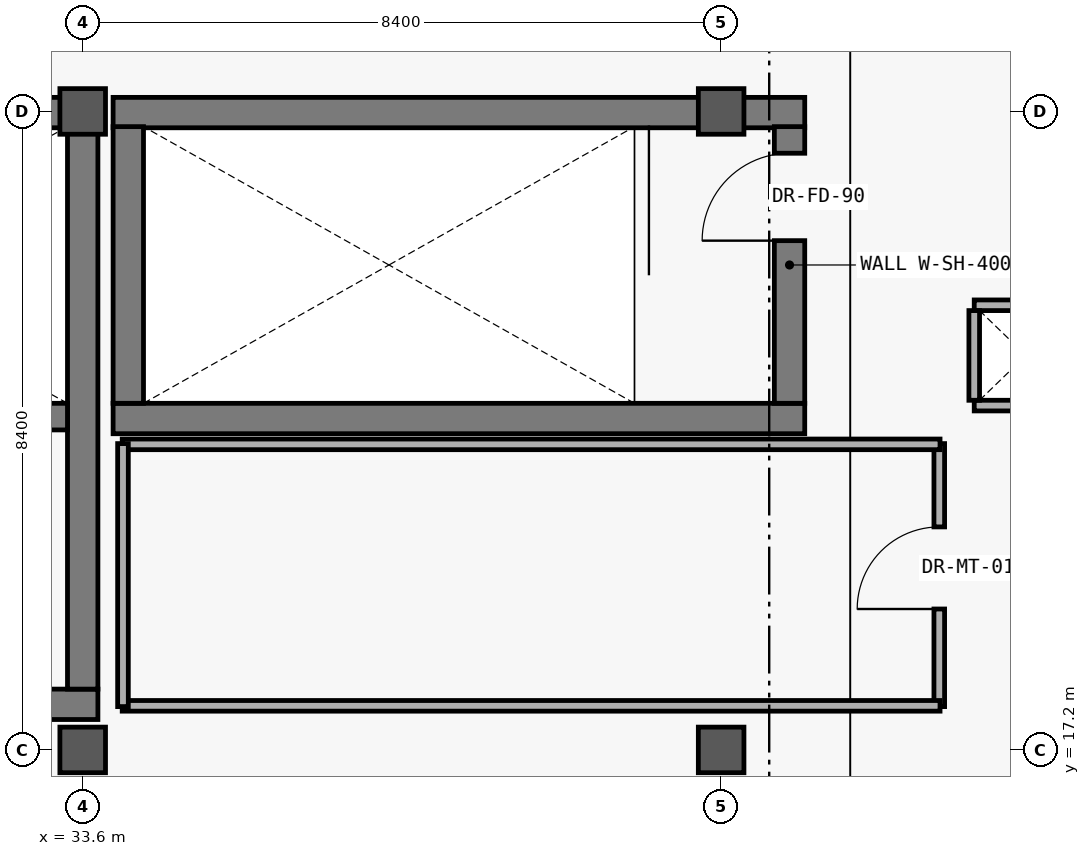
"""IFC4 building model, lengths in metres.
Left out: names, types, materials, properties, quantities, classifications, styles, units other than length and angle.
Written with IfcOpenShell. Run it as: python <this file> out.ifc"""

import sys

from ifc_helpers import new_model, si_unit, direction, frame, frame_2d, origin, origin_2d, place, context, subcontext, project, spatial, rectangle, extrude, element, fill, save


model = new_model("IFC4")
c1 = context("Model", 3, precision=1e-05, world=origin(), true_north=direction((0.0, 1.0)))
c2 = subcontext(c1, "Body", "Model", "MODEL_VIEW")
j1 = project(units=[si_unit("LENGTHUNIT", "METRE"), si_unit("PLANEANGLEUNIT", "RADIAN")], contexts=[c1])
p1 = place(None, origin())
s1 = spatial("IfcSite", under=j1, at=p1, CompositionType="ELEMENT")
p2 = place(p1, origin())
s2 = spatial("IfcBuilding", under=s1, at=p2, CompositionType="ELEMENT")
p3 = place(p2, frame((0.0, 0.0, 44.4)))
s3 = spatial("IfcBuildingStorey", under=s2, at=p3, CompositionType="ELEMENT", Elevation=44.4)
for number, where, z_axis, x_axis in (
    (1, (33.6, 17.2, 0.0), (0.0, 0.0, 1.0), (1.0, 0.0, 0.0)),
    (2, (33.6, 25.6, 0.0), (0.0, 0.0, 1.0), (1.0, 0.0, 0.0)),
    (3, (42.0, 17.2, 0.0), (0.0, 0.0, 1.0), (1.0, 0.0, 0.0)),
    (4, (42.0, 25.6, 0.0), (0.0, 0.0, 1.0), (1.0, 0.0, 0.0)),
):
    element("IfcColumn", number, at=place(p3, frame(where, z_axis=z_axis, x_axis=x_axis)), inside=s3, PredefinedType="COLUMN", context=c2, shape_type="SweptSolid", body=[
        extrude(rectangle(XDim=0.6, YDim=0.6, at=origin_2d()), origin(), (0.0, 0.0, 1.0), 4.2),
    ])
p4 = place(p3, frame((24.6, 17.8, 0.0), z_axis=(0.0, 0.0, 1.0), x_axis=(1.0, 0.0, 0.0)))
e5 = element("IfcWall", 5, at=p4, inside=s3, PredefinedType="SHEAR", context=c2, shape_type="SweptSolid", body=[
    extrude(rectangle(XDim=9.2, YDim=0.4, at=frame_2d((4.6, 0.0))), origin(), (0.0, 0.0, 1.0), 3.96),
])
p5 = place(p4, frame((1.1, 0.0, 0.0)))
e6 = element("IfcOpeningElement", 6, at=p5, cuts=e5, PredefinedType="OPENING", context=c2, shape_type="SweptSolid", body=[
    extrude(rectangle(XDim=1.2, YDim=2.2, at=frame_2d((0.6, 1.1))), frame((0.0, 0.21, 0.0), z_axis=(0.0, -1.0, 0.0), x_axis=(1.0, 0.0, 0.0)), (0.0, 0.0, 1.0), 0.42),
])
p6 = place(p4, frame((3.5, 0.0, 0.0)))
e7 = element("IfcOpeningElement", 7, at=p6, cuts=e5, PredefinedType="OPENING", context=c2, shape_type="SweptSolid", body=[
    extrude(rectangle(XDim=1.1, YDim=2.2, at=frame_2d((0.55, 1.1))), frame((0.0, 0.21, 0.0), z_axis=(0.0, -1.0, 0.0), x_axis=(1.0, 0.0, 0.0)), (0.0, 0.0, 1.0), 0.42),
])
p7 = place(p4, frame((5.9, 0.0, 0.0)))
e8 = element("IfcOpeningElement", 8, at=p7, cuts=e5, PredefinedType="OPENING", context=c2, shape_type="SweptSolid", body=[
    extrude(rectangle(XDim=1.1, YDim=2.2, at=frame_2d((0.55, 1.1))), frame((0.0, 0.21, 0.0), z_axis=(0.0, -1.0, 0.0), x_axis=(1.0, 0.0, 0.0)), (0.0, 0.0, 1.0), 0.42),
])
p8 = place(p3, frame((33.8, 25.585, 0.0), z_axis=(0.0, 0.0, 1.0), x_axis=(-1.0, 0.0, 0.0)))
e9 = element("IfcWall", 9, at=p8, inside=s3, PredefinedType="SHEAR", context=c2, shape_type="SweptSolid", body=[
    extrude(rectangle(XDim=9.2, YDim=0.4, at=frame_2d((4.6, 0.0))), origin(), (0.0, 0.0, 1.0), 3.96),
])
p9 = place(p3, frame((33.6, 18.0, 0.0), z_axis=(0.0, 0.0, 1.0), x_axis=(0.0, 1.0, 0.0)))
e10 = element("IfcWall", 10, at=p9, inside=s3, PredefinedType="SHEAR", context=c2, shape_type="SweptSolid", body=[
    extrude(rectangle(XDim=7.4, YDim=0.4, at=frame_2d((3.7, 0.0))), origin(), (0.0, 0.0, 1.0), 3.96),
])
p10 = place(p3, frame((25.0, 21.585, 0.0), z_axis=(0.0, 0.0, 1.0), x_axis=(1.0, 0.0, 0.0)))
e11 = element("IfcWall", 11, at=p10, inside=s3, PredefinedType="SHEAR", context=c2, shape_type="SweptSolid", body=[
    extrude(rectangle(XDim=8.4, YDim=0.35, at=frame_2d((4.2, 0.0))), origin(), (0.0, 0.0, 1.0), 3.96),
])
for number, where, z_axis, x_axis in (
    (12, (34.0, 21.56, 0.0), (0.0, 0.0, 1.0), (1.0, 0.0, 0.0)),
    (13, (43.1, 25.585, 0.0), (0.0, 0.0, 1.0), (-1.0, 0.0, 0.0)),
):
    element("IfcWall", number, at=place(p3, frame(where, z_axis=z_axis, x_axis=x_axis)), inside=s3, PredefinedType="SHEAR", context=c2, shape_type="SweptSolid", body=[
        extrude(rectangle(XDim=9.1, YDim=0.4, at=frame_2d((4.55, 0.0))), origin(), (0.0, 0.0, 1.0), 3.96),
    ])
p11 = place(p3, frame((34.2, 25.4, 0.0), z_axis=(0.0, 0.0, 1.0), x_axis=(0.0, -1.0, 0.0)))
e14 = element("IfcWall", 14, at=p11, inside=s3, PredefinedType="SHEAR", context=c2, shape_type="SweptSolid", body=[
    extrude(rectangle(XDim=3.64, YDim=0.4, at=frame_2d((1.82, 0.0))), origin(), (0.0, 0.0, 1.0), 3.96),
])
p12 = place(p3, frame((42.9, 21.76, 0.0), z_axis=(0.0, 0.0, 1.0), x_axis=(0.0, 1.0, 0.0)))
e15 = element("IfcWall", 15, at=p12, inside=s3, PredefinedType="SHEAR", context=c2, shape_type="SweptSolid", body=[
    extrude(rectangle(XDim=3.64, YDim=0.4, at=frame_2d((1.82, 0.0))), origin(), (0.0, 0.0, 1.0), 3.96),
])
p13 = place(p12, frame((2.14, 0.0, 0.0)))
e16 = element("IfcOpeningElement", 16, at=p13, cuts=e15, PredefinedType="OPENING", context=c2, shape_type="SweptSolid", body=[
    extrude(rectangle(XDim=1.15, YDim=2.2, at=frame_2d((0.575, 1.1))), frame((0.0, 0.21, 0.0), z_axis=(0.0, -1.0, 0.0), x_axis=(1.0, 0.0, 0.0)), (0.0, 0.0, 1.0), 0.42),
])
p14 = place(p3, frame((44.87, 17.77, 0.0), z_axis=(0.0, 0.0, 1.0), x_axis=(0.0, 1.0, 0.0)))
e17 = element("IfcWall", 17, at=p14, inside=s3, PredefinedType="PARTITIONING", context=c2, shape_type="SweptSolid", body=[
    extrude(rectangle(XDim=3.46, YDim=0.14, at=frame_2d((1.73, 0.0))), origin(), (0.0, 0.0, 1.0), 3.06),
])
p15 = place(p14, frame((1.284, 0.0, 0.0)))
e18 = element("IfcOpeningElement", 18, at=p15, cuts=e17, PredefinedType="OPENING", context=c2, shape_type="SweptSolid", body=[
    extrude(rectangle(XDim=1.08, YDim=2.25, at=frame_2d((0.54, 1.125))), frame((0.0, 0.08, 0.0), z_axis=(0.0, -1.0, 0.0), x_axis=(1.0, 0.0, 0.0)), (0.0, 0.0, 1.0), 0.16),
])
for number, where, z_axis, x_axis in (
    (19, (34.12, 17.78, 0.0), (0.0, 0.0, 1.0), (1.0, 0.0, 0.0)),
    (20, (34.12, 21.22, 0.0), (0.0, 0.0, 1.0), (1.0, 0.0, 0.0)),
):
    element("IfcWall", number, at=place(p3, frame(where, z_axis=z_axis, x_axis=x_axis)), inside=s3, PredefinedType="PARTITIONING", context=c2, shape_type="SweptSolid", body=[
        extrude(rectangle(XDim=10.76, YDim=0.14, at=frame_2d((5.38, 0.0))), origin(), (0.0, 0.0, 1.0), 3.06),
    ])
p16 = place(p3, frame((34.13, 17.77, 0.0), z_axis=(0.0, 0.0, 1.0), x_axis=(0.0, 1.0, 0.0)))
e21 = element("IfcWall", 21, at=p16, inside=s3, PredefinedType="PARTITIONING", context=c2, shape_type="SweptSolid", body=[
    extrude(rectangle(XDim=3.46, YDim=0.14, at=frame_2d((1.73, 0.0))), origin(), (0.0, 0.0, 1.0), 3.06),
])
for number, where, z_axis, x_axis in (
    (22, (45.33, 21.73, 0.0), (0.0, 0.0, 1.0), (1.0, 0.0, 0.0)),
    (23, (46.69, 23.05, 0.0), (0.0, 0.0, 1.0), (-1.0, 0.0, 0.0)),
):
    element("IfcWall", number, at=place(p3, frame(where, z_axis=z_axis, x_axis=x_axis)), inside=s3, PredefinedType="PARTITIONING", context=c2, shape_type="SweptSolid", body=[
        extrude(rectangle(XDim=1.36, YDim=0.14, at=frame_2d((0.68, 0.0))), origin(), (0.0, 0.0, 1.0), 3.08),
    ])
p17 = place(p3, frame((45.33, 22.98, 0.0), z_axis=(0.0, 0.0, 1.0), x_axis=(0.0, -1.0, 0.0)))
e24 = element("IfcWall", 24, at=p17, inside=s3, PredefinedType="PARTITIONING", context=c2, shape_type="SweptSolid", body=[
    extrude(rectangle(XDim=1.18, YDim=0.14, at=frame_2d((0.59, 0.0))), origin(), (0.0, 0.0, 1.0), 3.08),
])
p18 = place(p13, origin())
e25 = element("IfcDoor", 25, at=p18, inside=s3, OperationType="SINGLE_SWING_LEFT", PredefinedType="DOOR", context=c2, shape_type="SweptSolid", body=[
    extrude(rectangle(XDim=1.15, YDim=2.2, at=frame_2d((0.575, 1.1))), frame((0.0, 0.025, 0.0), z_axis=(0.0, -1.0, 0.0), x_axis=(1.0, 0.0, 0.0)), (0.0, 0.0, 1.0), 0.05),
])
fill(e16, e25)
p19 = place(p15, origin())
e26 = element("IfcDoor", 26, at=p19, inside=s3, OperationType="SINGLE_SWING_LEFT", PredefinedType="DOOR", context=c2, shape_type="SweptSolid", body=[
    extrude(rectangle(XDim=1.08, YDim=2.25, at=frame_2d((0.54, 1.125))), frame((0.0, 0.025, 0.0), z_axis=(0.0, -1.0, 0.0), x_axis=(1.0, 0.0, 0.0)), (0.0, 0.0, 1.0), 0.05),
])
fill(e18, e26)
save(model, sys.argv[1])
